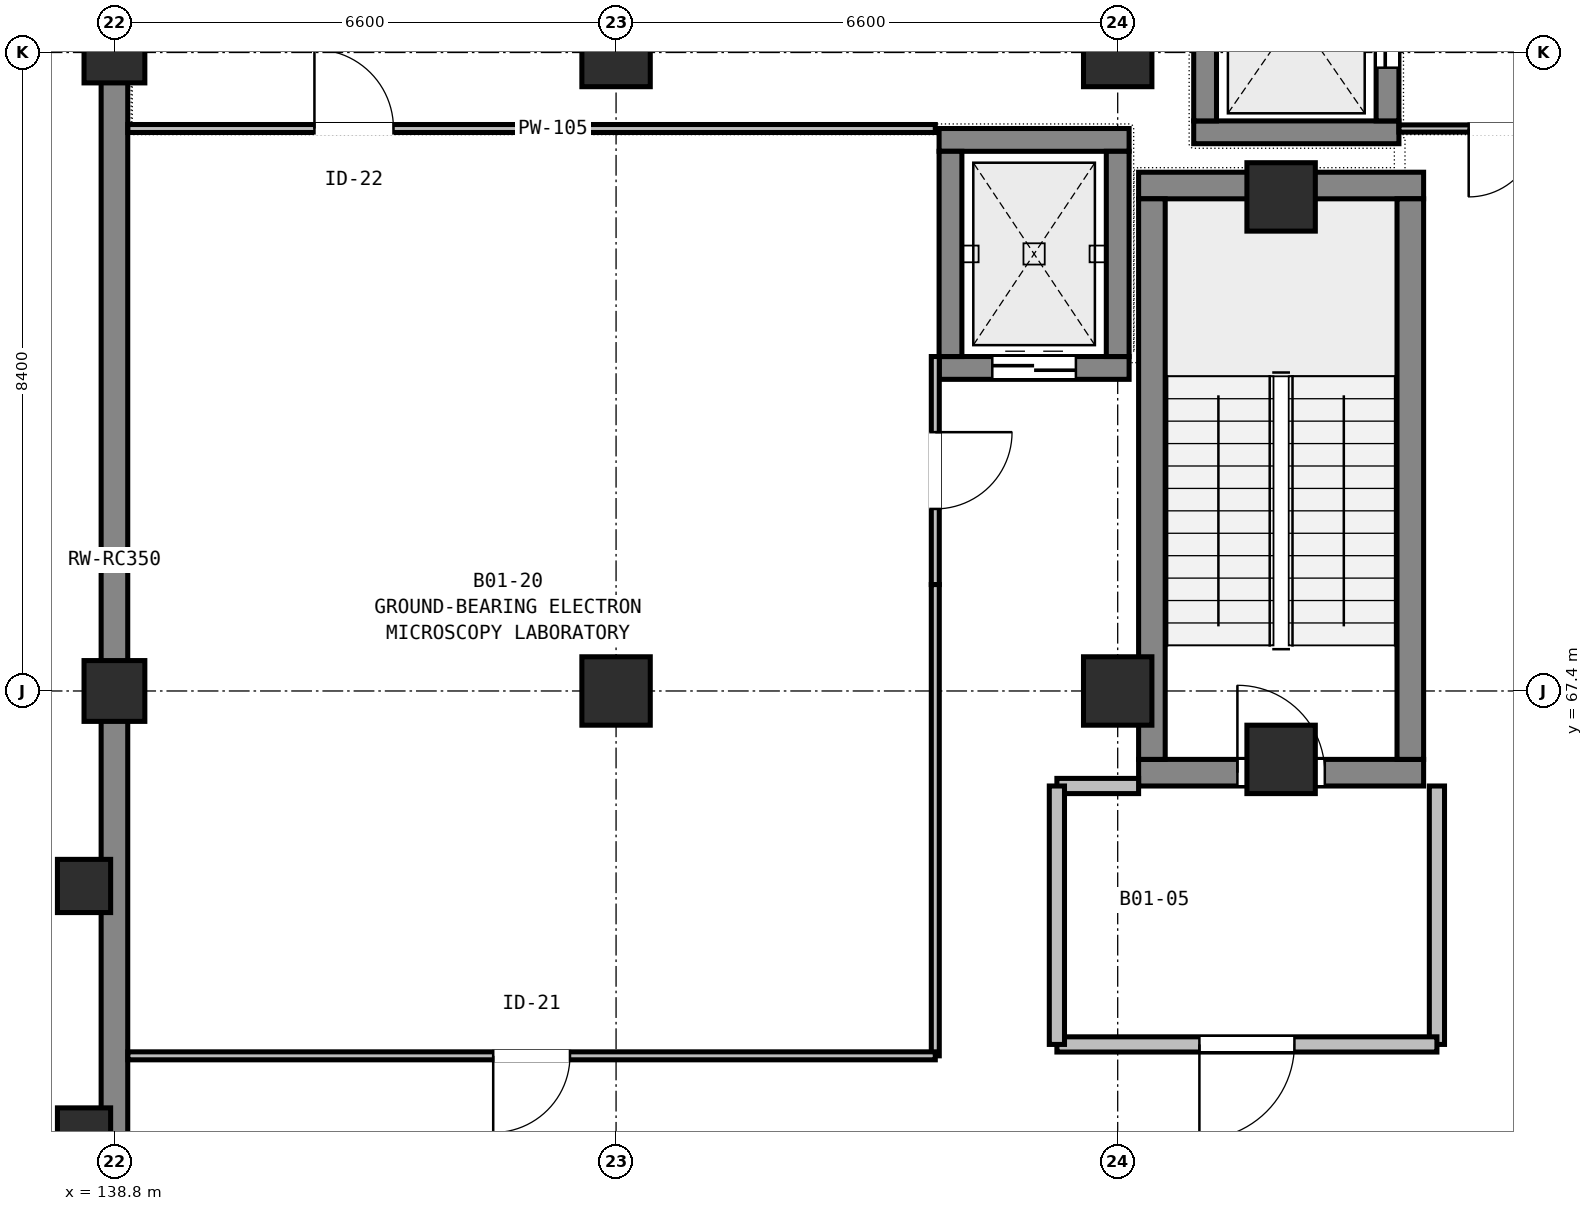
"""IFC4 building model, lengths in metres.
Left out: names, types, materials, properties, quantities, classifications, styles, units other than length and angle.
Written with IfcOpenShell. Run it as: python <this file> out.ifc"""

import sys

from ifc_helpers import new_model, si_unit, direction, frame, frame_2d, origin, origin_2d, place, context, subcontext, project, spatial, rectangle, extrude, element, fill, save


model = new_model("IFC4")
c1 = context("Model", 3, precision=1e-05, world=origin(), true_north=direction((0.0, 1.0)))
c2 = subcontext(c1, "Body", "Model", "MODEL_VIEW")
j1 = project(units=[si_unit("LENGTHUNIT", "METRE"), si_unit("PLANEANGLEUNIT", "RADIAN")], contexts=[c1])
p1 = place(None, origin())
s1 = spatial("IfcSite", under=j1, at=p1, CompositionType="ELEMENT")
p2 = place(p1, origin())
s2 = spatial("IfcBuilding", under=s1, at=p2, CompositionType="ELEMENT")
p3 = place(p2, frame((0.0, 0.0, -4.5)))
s3 = spatial("IfcBuildingStorey", under=s2, at=p3, CompositionType="ELEMENT", Elevation=-4.5)
for number, where, z_axis, x_axis in (
    (1, (138.8, 67.4, 0.0), (0.0, 0.0, 1.0), (1.0, 0.0, 0.0)),
    (2, (138.8, 75.8, 0.0), (0.0, 0.0, 1.0), (1.0, 0.0, 0.0)),
    (3, (145.4, 67.4, 0.0), (0.0, 0.0, 1.0), (1.0, 0.0, 0.0)),
    (4, (145.4, 75.8, 0.0), (0.0, 0.0, 1.0), (1.0, 0.0, 0.0)),
    (5, (152.0, 67.4, 0.0), (0.0, 0.0, 1.0), (1.0, 0.0, 0.0)),
    (6, (152.0, 75.8, 0.0), (0.0, 0.0, 1.0), (1.0, 0.0, 0.0)),
):
    element("IfcColumn", number, at=place(p3, frame(where, z_axis=z_axis, x_axis=x_axis)), inside=s3, PredefinedType="COLUMN", context=c2, shape_type="SweptSolid", body=[
        extrude(rectangle(XDim=0.8, YDim=0.8, at=origin_2d()), origin(), (0.0, 0.0, 1.0), 4.5),
    ])
p4 = place(p3, frame((152.275, 66.325, 0.0), z_axis=(0.0, 0.0, 1.0), x_axis=(1.0, 0.0, 0.0)))
e7 = element("IfcWall", 7, at=p4, inside=s3, PredefinedType="SHEAR", context=c2, shape_type="SweptSolid", body=[
    extrude(rectangle(XDim=3.75, YDim=0.35, at=frame_2d((1.875, 0.0))), origin(), (0.0, 0.0, 1.0), 4.5),
])
p5 = place(p4, frame((1.3, 0.0, 0.0)))
e8 = element("IfcOpeningElement", 8, at=p5, cuts=e7, PredefinedType="OPENING", context=c2, shape_type="SweptSolid", body=[
    extrude(rectangle(XDim=1.15, YDim=2.15, at=frame_2d((0.575, 1.075))), frame((0.0, 0.185, 0.0), z_axis=(0.0, -1.0, 0.0), x_axis=(1.0, 0.0, 0.0)), (0.0, 0.0, 1.0), 0.37),
])
p6 = place(p3, frame((152.275, 74.05, 0.0), z_axis=(0.0, 0.0, 1.0), x_axis=(1.0, 0.0, 0.0)))
e9 = element("IfcWall", 9, at=p6, inside=s3, PredefinedType="SHEAR", context=c2, shape_type="SweptSolid", body=[
    extrude(rectangle(XDim=3.75, YDim=0.35, at=frame_2d((1.875, 0.0))), origin(), (0.0, 0.0, 1.0), 4.5),
])
for number, where, z_axis, x_axis in (
    (10, (152.45, 66.5, 0.0), (0.0, 0.0, 1.0), (0.0, 1.0, 0.0)),
    (11, (155.85, 66.5, 0.0), (0.0, 0.0, 1.0), (0.0, 1.0, 0.0)),
):
    element("IfcWall", number, at=place(p3, frame(where, z_axis=z_axis, x_axis=x_axis)), inside=s3, PredefinedType="SHEAR", context=c2, shape_type="SweptSolid", body=[
        extrude(rectangle(XDim=7.375, YDim=0.35, at=frame_2d((3.688, 0.0))), origin(), (0.0, 0.0, 1.0), 4.5),
    ])
p7 = place(p3, frame((149.65, 71.65, -0.82), z_axis=(0.0, 0.0, 1.0), x_axis=(1.0, 0.0, 0.0)))
e12 = element("IfcWall", 12, at=p7, inside=s3, PredefinedType="SHEAR", context=c2, shape_type="SweptSolid", body=[
    extrude(rectangle(XDim=2.5, YDim=0.3, at=frame_2d((1.25, 0.0))), origin(), (0.0, 0.0, 1.0), 5.32),
])
p8 = place(p7, frame((0.7, 0.0, 0.82)))
e13 = element("IfcOpeningElement", 13, at=p8, cuts=e12, PredefinedType="OPENING", context=c2, shape_type="SweptSolid", body=[
    extrude(rectangle(XDim=1.1, YDim=2.1, at=frame_2d((0.55, 1.05))), frame((0.0, 0.16, 0.0), z_axis=(0.0, -1.0, 0.0), x_axis=(1.0, 0.0, 0.0)), (0.0, 0.0, 1.0), 0.32),
])
p9 = place(p3, frame((149.65, 74.65, -0.82), z_axis=(0.0, 0.0, 1.0), x_axis=(1.0, 0.0, 0.0)))
e14 = element("IfcWall", 14, at=p9, inside=s3, PredefinedType="SHEAR", context=c2, shape_type="SweptSolid", body=[
    extrude(rectangle(XDim=2.5, YDim=0.3, at=frame_2d((1.25, 0.0))), origin(), (0.0, 0.0, 1.0), 5.32),
])
for number, where, z_axis, x_axis in (
    (15, (149.8, 71.8, -0.82), (0.0, 0.0, 1.0), (0.0, 1.0, 0.0)),
    (16, (152.0, 71.8, -0.82), (0.0, 0.0, 1.0), (0.0, 1.0, 0.0)),
    (17, (153.0, 74.75, -0.82), (0.0, 0.0, 1.0), (1.0, 0.0, 0.0)),
):
    element("IfcWall", number, at=place(p3, frame(where, z_axis=z_axis, x_axis=x_axis)), inside=s3, PredefinedType="SHEAR", context=c2, shape_type="SweptSolid", body=[
        extrude(rectangle(XDim=2.7, YDim=0.3, at=frame_2d((1.35, 0.0))), origin(), (0.0, 0.0, 1.0), 5.32),
    ])
p10 = place(p3, frame((153.15, 74.9, -0.82), z_axis=(0.0, 0.0, 1.0), x_axis=(0.0, 1.0, 0.0)))
e18 = element("IfcWall", 18, at=p10, inside=s3, PredefinedType="SHEAR", context=c2, shape_type="SweptSolid", body=[
    extrude(rectangle(XDim=2.8, YDim=0.3, at=frame_2d((1.4, 0.0))), origin(), (0.0, 0.0, 1.0), 5.32),
])
p11 = place(p3, frame((155.55, 74.9, -0.82), z_axis=(0.0, 0.0, 1.0), x_axis=(0.0, 1.0, 0.0)))
e19 = element("IfcWall", 19, at=p11, inside=s3, PredefinedType="SHEAR", context=c2, shape_type="SweptSolid", body=[
    extrude(rectangle(XDim=2.8, YDim=0.3, at=frame_2d((1.4, 0.0))), origin(), (0.0, 0.0, 1.0), 5.32),
])
p12 = place(p11, frame((0.7, 0.0, 0.82)))
e20 = element("IfcOpeningElement", 20, at=p12, cuts=e19, PredefinedType="OPENING", context=c2, shape_type="SweptSolid", body=[
    extrude(rectangle(XDim=1.4, YDim=2.2, at=frame_2d((0.7, 1.1))), frame((0.0, 0.16, 0.0), z_axis=(0.0, -1.0, 0.0), x_axis=(1.0, 0.0, 0.0)), (0.0, 0.0, 1.0), 0.32),
])
p13 = place(p3, frame((138.8, 59.175, 0.0), z_axis=(0.0, 0.0, 1.0), x_axis=(0.0, 1.0, 0.0)))
e21 = element("IfcWall", 21, at=p13, inside=s3, PredefinedType="SOLIDWALL", context=c2, shape_type="SweptSolid", body=[
    extrude(rectangle(XDim=24.85, YDim=0.35, at=frame_2d((12.425, 0.0))), origin(), (0.0, 0.0, 1.0), 4.5),
])
for number, where, z_axis, x_axis in (
    (22, (138.4, 61.565, -0.4), (0.0, 0.0, 1.0), (1.0, 0.0, 0.0)),
    (23, (138.4, 64.835, -0.4), (0.0, 0.0, 1.0), (1.0, 0.0, 0.0)),
):
    element("IfcColumn", number, at=place(p3, frame(where, z_axis=z_axis, x_axis=x_axis)), inside=s3, PredefinedType="COLUMN", context=c2, shape_type="SweptSolid", body=[
        extrude(rectangle(XDim=0.7, YDim=0.7, at=origin_2d()), origin(), (0.0, 0.0, 1.0), 4.58),
    ])
for number, where, z_axis, x_axis in (
    (24, (145.4, 67.4, -1.2), (0.0, 0.0, 1.0), (1.0, 0.0, 0.0)),
    (25, (145.4, 75.8, -1.2), (0.0, 0.0, 1.0), (1.0, 0.0, 0.0)),
    (26, (152.0, 67.4, -1.2), (0.0, 0.0, 1.0), (1.0, 0.0, 0.0)),
    (27, (152.0, 75.8, -1.2), (0.0, 0.0, 1.0), (1.0, 0.0, 0.0)),
    (28, (154.15, 66.5, -1.2), (0.0, 0.0, 1.0), (1.0, 0.0, 0.0)),
    (29, (154.15, 73.9, -1.2), (0.0, 0.0, 1.0), (1.0, 0.0, 0.0)),
):
    element("IfcColumn", number, at=place(p3, frame(where, z_axis=z_axis, x_axis=x_axis)), inside=s3, PredefinedType="COLUMN", context=c2, shape_type="SweptSolid", body=[
        extrude(rectangle(XDim=0.9, YDim=0.9, at=origin_2d()), origin(), (0.0, 0.0, 1.0), 1.2),
    ])
p14 = place(p3, frame((151.2, 66.15, 0.0), z_axis=(0.0, 0.0, 1.0), x_axis=(1.0, 0.0, 0.0)))
e30 = element("IfcWall", 30, at=p14, inside=s3, PredefinedType="PARTITIONING", context=c2, shape_type="SweptSolid", body=[
    extrude(rectangle(XDim=1.075, YDim=0.2, at=frame_2d((0.538, 0.0))), origin(), (0.0, 0.0, 1.0), 3.635),
])
p15 = place(p3, frame((156.2, 66.15, 0.0), z_axis=(0.0, 0.0, 1.0), x_axis=(0.0, -1.0, 0.0)))
e31 = element("IfcWall", 31, at=p15, inside=s3, PredefinedType="PARTITIONING", context=c2, shape_type="SweptSolid", body=[
    extrude(rectangle(XDim=3.4, YDim=0.2, at=frame_2d((1.7, 0.0))), origin(), (0.0, 0.0, 1.0), 4.175),
])
p16 = place(p3, frame((156.2, 62.75, 0.0), z_axis=(0.0, 0.0, 1.0), x_axis=(-1.0, 0.0, 0.0)))
e32 = element("IfcWall", 32, at=p16, inside=s3, PredefinedType="PARTITIONING", context=c2, shape_type="SweptSolid", body=[
    extrude(rectangle(XDim=5.0, YDim=0.2, at=frame_2d((2.5, 0.0))), origin(), (0.0, 0.0, 1.0), 3.635),
])
p17 = place(p16, frame((1.875, 0.0, 0.0)))
e33 = element("IfcOpeningElement", 33, at=p17, cuts=e32, PredefinedType="OPENING", context=c2, shape_type="SweptSolid", body=[
    extrude(rectangle(XDim=1.25, YDim=2.15, at=frame_2d((0.625, 1.075))), frame((0.0, 0.11, 0.0), z_axis=(0.0, -1.0, 0.0), x_axis=(1.0, 0.0, 0.0)), (0.0, 0.0, 1.0), 0.22),
])
p18 = place(p3, frame((151.2, 62.75, 0.0), z_axis=(0.0, 0.0, 1.0), x_axis=(0.0, 1.0, 0.0)))
e34 = element("IfcWall", 34, at=p18, inside=s3, PredefinedType="PARTITIONING", context=c2, shape_type="SweptSolid", body=[
    extrude(rectangle(XDim=3.4, YDim=0.2, at=frame_2d((1.7, 0.0))), origin(), (0.0, 0.0, 1.0), 4.175),
])
p19 = place(p3, frame((149.6, 71.8, 0.0), z_axis=(0.0, 0.0, 1.0), x_axis=(0.0, -1.0, 0.0)))
e35 = element("IfcWall", 35, at=p19, inside=s3, PredefinedType="PARTITIONING", context=c2, shape_type="SweptSolid", body=[
    extrude(rectangle(XDim=3.0, YDim=0.105, at=frame_2d((1.5, 0.0))), origin(), (0.0, 0.0, 1.0), 4.175),
])
p20 = place(p19, frame((0.995, 0.0, 0.0)))
e36 = element("IfcOpeningElement", 36, at=p20, cuts=e35, PredefinedType="OPENING", context=c2, shape_type="SweptSolid", body=[
    extrude(rectangle(XDim=1.01, YDim=2.14, at=frame_2d((0.505, 1.07))), frame((0.0, 0.062, 0.0), z_axis=(0.0, -1.0, 0.0), x_axis=(1.0, 0.0, 0.0)), (0.0, 0.0, 1.0), 0.125),
])
p21 = place(p3, frame((149.6, 68.8, 0.0), z_axis=(0.0, 0.0, 1.0), x_axis=(0.0, -1.0, 0.0)))
e37 = element("IfcWall", 37, at=p21, inside=s3, PredefinedType="PARTITIONING", context=c2, shape_type="SweptSolid", body=[
    extrude(rectangle(XDim=6.2, YDim=0.105, at=frame_2d((3.1, 0.0))), origin(), (0.0, 0.0, 1.0), 3.835),
])
p22 = place(p3, frame((149.6, 62.6, 0.0), z_axis=(0.0, 0.0, 1.0), x_axis=(-1.0, 0.0, 0.0)))
e38 = element("IfcWall", 38, at=p22, inside=s3, PredefinedType="PARTITIONING", context=c2, shape_type="SweptSolid", body=[
    extrude(rectangle(XDim=10.623, YDim=0.105, at=frame_2d((5.312, 0.0))), origin(), (0.0, 0.0, 1.0), 3.635),
])
p23 = place(p22, frame((4.806, 0.0, 0.0)))
e39 = element("IfcOpeningElement", 39, at=p23, cuts=e38, PredefinedType="OPENING", context=c2, shape_type="SweptSolid", body=[
    extrude(rectangle(XDim=1.01, YDim=2.14, at=frame_2d((0.505, 1.07))), frame((0.0, 0.062, 0.0), z_axis=(0.0, -1.0, 0.0), x_axis=(1.0, 0.0, 0.0)), (0.0, 0.0, 1.0), 0.125),
])
p24 = place(p3, frame((138.977, 74.8, 0.0), z_axis=(0.0, 0.0, 1.0), x_axis=(1.0, 0.0, 0.0)))
e40 = element("IfcWall", 40, at=p24, inside=s3, PredefinedType="PARTITIONING", context=c2, shape_type="SweptSolid", body=[
    extrude(rectangle(XDim=10.623, YDim=0.105, at=frame_2d((5.312, 0.0))), origin(), (0.0, 0.0, 1.0), 3.635),
])
p25 = place(p24, frame((2.454, 0.0, 0.0)))
e41 = element("IfcOpeningElement", 41, at=p25, cuts=e40, PredefinedType="OPENING", context=c2, shape_type="SweptSolid", body=[
    extrude(rectangle(XDim=1.04, YDim=2.14, at=frame_2d((0.52, 1.07))), frame((0.0, 0.062, 0.0), z_axis=(0.0, -1.0, 0.0), x_axis=(1.0, 0.0, 0.0)), (0.0, 0.0, 1.0), 0.125),
])
p26 = place(p3, frame((159.3, 74.8, 0.0), z_axis=(0.0, 0.0, 1.0), x_axis=(-1.0, 0.0, 0.0)))
e42 = element("IfcWall", 42, at=p26, inside=s3, PredefinedType="PARTITIONING", context=c2, shape_type="SweptSolid", body=[
    extrude(rectangle(XDim=3.6, YDim=0.095, at=frame_2d((1.8, 0.0))), origin(), (0.0, 0.0, 1.0), 3.635),
])
p27 = place(p26, frame((1.782, 0.0, 0.0)))
e43 = element("IfcOpeningElement", 43, at=p27, cuts=e42, PredefinedType="OPENING", context=c2, shape_type="SweptSolid", body=[
    extrude(rectangle(XDim=0.9, YDim=2.02, at=frame_2d((0.45, 1.01))), frame((0.0, 0.057, 0.0), z_axis=(0.0, -1.0, 0.0), x_axis=(1.0, 0.0, 0.0)), (0.0, 0.0, 1.0), 0.115),
])
p28 = place(p5, origin())
e44 = element("IfcDoor", 44, at=p28, inside=s3, OperationType="SINGLE_SWING_LEFT", PredefinedType="DOOR", context=c2, shape_type="SweptSolid", body=[
    extrude(rectangle(XDim=1.15, YDim=2.15, at=frame_2d((0.575, 1.075))), frame((0.0, 0.025, 0.0), z_axis=(0.0, -1.0, 0.0), x_axis=(1.0, 0.0, 0.0)), (0.0, 0.0, 1.0), 0.05),
])
fill(e8, e44)
p29 = place(p8, origin())
e45 = element("IfcDoor", 45, at=p29, inside=s3, OperationType="DOUBLE_DOOR_SLIDING", PredefinedType="DOOR", context=c2, shape_type="SweptSolid", body=[
    extrude(rectangle(XDim=1.1, YDim=2.1, at=frame_2d((0.55, 1.05))), frame((0.0, 0.025, 0.0), z_axis=(0.0, -1.0, 0.0), x_axis=(1.0, 0.0, 0.0)), (0.0, 0.0, 1.0), 0.05),
])
fill(e13, e45)
p30 = place(p12, origin())
e46 = element("IfcDoor", 46, at=p30, inside=s3, OperationType="DOUBLE_DOOR_SLIDING", PredefinedType="DOOR", context=c2, shape_type="SweptSolid", body=[
    extrude(rectangle(XDim=1.4, YDim=2.2, at=frame_2d((0.7, 1.1))), frame((0.0, 0.025, 0.0), z_axis=(0.0, -1.0, 0.0), x_axis=(1.0, 0.0, 0.0)), (0.0, 0.0, 1.0), 0.05),
])
fill(e20, e46)
p31 = place(p17, origin())
e47 = element("IfcDoor", 47, at=p31, inside=s3, OperationType="SINGLE_SWING_RIGHT", PredefinedType="DOOR", context=c2, shape_type="SweptSolid", body=[
    extrude(rectangle(XDim=1.25, YDim=2.15, at=frame_2d((0.625, 1.075))), frame((0.0, 0.025, 0.0), z_axis=(0.0, -1.0, 0.0), x_axis=(1.0, 0.0, 0.0)), (0.0, 0.0, 1.0), 0.05),
])
fill(e33, e47)
p32 = place(p23, origin())
e48 = element("IfcDoor", 48, at=p32, inside=s3, OperationType="SINGLE_SWING_RIGHT", PredefinedType="DOOR", context=c2, shape_type="SweptSolid", body=[
    extrude(rectangle(XDim=1.01, YDim=2.14, at=frame_2d((0.505, 1.07))), frame((0.0, 0.025, 0.0), z_axis=(0.0, -1.0, 0.0), x_axis=(1.0, 0.0, 0.0)), (0.0, 0.0, 1.0), 0.05),
])
fill(e39, e48)
p33 = place(p20, origin())
e49 = element("IfcDoor", 49, at=p33, inside=s3, OperationType="SINGLE_SWING_LEFT", PredefinedType="DOOR", context=c2, shape_type="SweptSolid", body=[
    extrude(rectangle(XDim=1.01, YDim=2.14, at=frame_2d((0.505, 1.07))), frame((0.0, 0.025, 0.0), z_axis=(0.0, -1.0, 0.0), x_axis=(1.0, 0.0, 0.0)), (0.0, 0.0, 1.0), 0.05),
])
fill(e36, e49)
p34 = place(p27, origin())
e50 = element("IfcDoor", 50, at=p34, inside=s3, OperationType="SINGLE_SWING_RIGHT", PredefinedType="DOOR", context=c2, shape_type="SweptSolid", body=[
    extrude(rectangle(XDim=0.9, YDim=2.02, at=frame_2d((0.45, 1.01))), frame((0.0, 0.025, 0.0), z_axis=(0.0, -1.0, 0.0), x_axis=(1.0, 0.0, 0.0)), (0.0, 0.0, 1.0), 0.05),
])
fill(e43, e50)
p35 = place(p25, origin())
e51 = element("IfcDoor", 51, at=p35, inside=s3, OperationType="SINGLE_SWING_LEFT", PredefinedType="DOOR", context=c2, shape_type="SweptSolid", body=[
    extrude(rectangle(XDim=1.04, YDim=2.14, at=frame_2d((0.52, 1.07))), frame((0.0, 0.025, 0.0), z_axis=(0.0, -1.0, 0.0), x_axis=(1.0, 0.0, 0.0)), (0.0, 0.0, 1.0), 0.05),
])
fill(e41, e51)
save(model, sys.argv[1])
